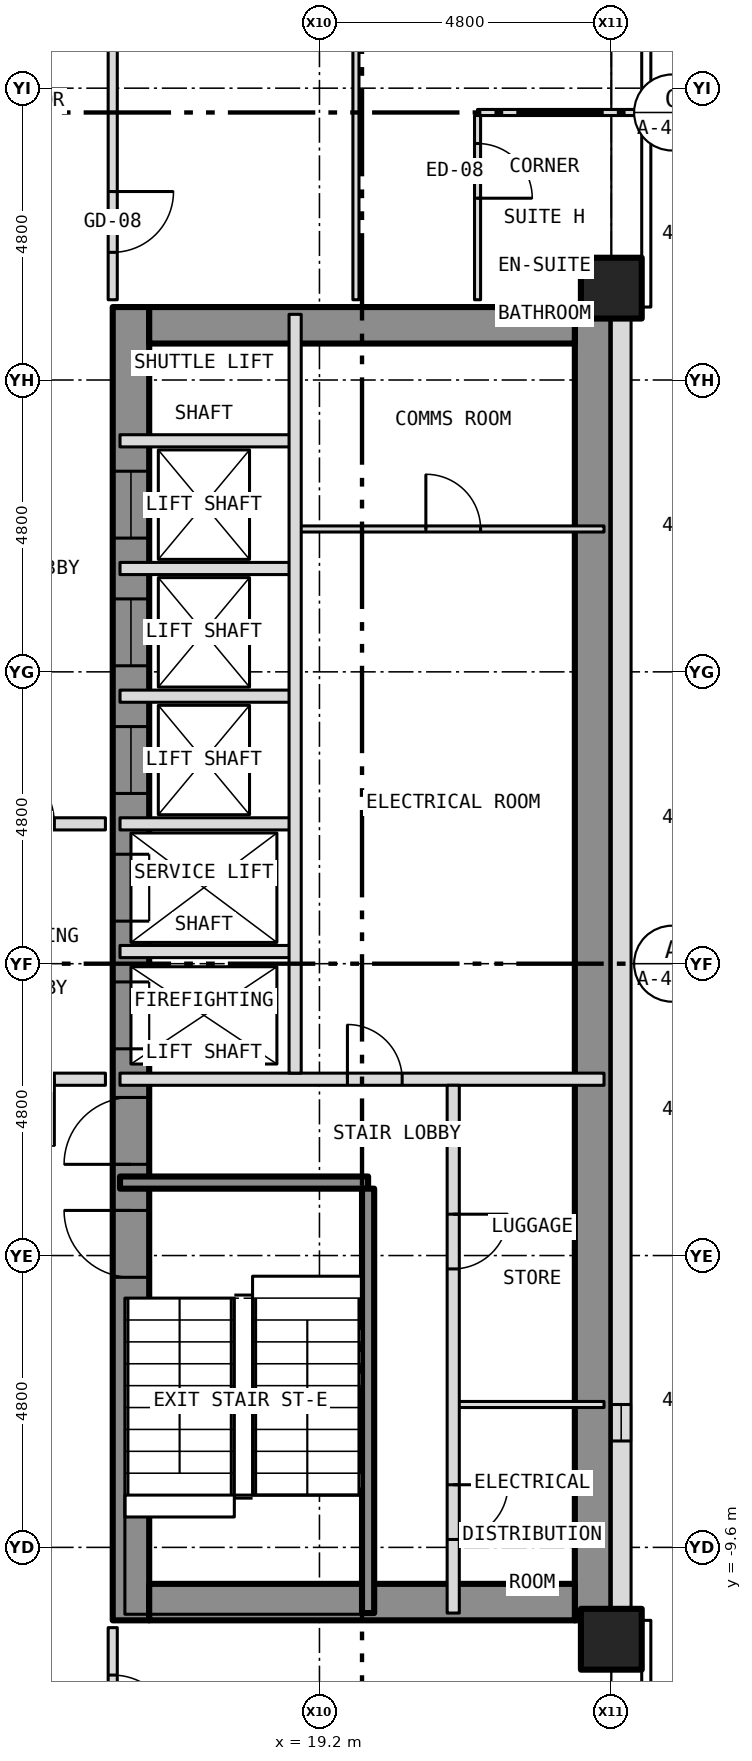
"""IFC4 building model, lengths in metres.
Left out: names, types, materials, properties, quantities, classifications, styles, units other than length and angle.
Written with IfcOpenShell. Run it as: python <this file> out.ifc"""

import sys

from ifc_helpers import new_model, si_unit, direction, frame, frame_2d, origin, origin_2d, place, context, subcontext, project, spatial, rectangle, hollow_rectangle, extrude, element, fill, save


model = new_model("IFC4")
c1 = context("Model", 3, precision=1e-05, world=origin(), true_north=direction((0.0, 1.0)))
c2 = subcontext(c1, "Body", "Model", "MODEL_VIEW")
j1 = project(units=[si_unit("LENGTHUNIT", "METRE"), si_unit("PLANEANGLEUNIT", "RADIAN")], contexts=[c1])
p1 = place(None, origin())
s1 = spatial("IfcSite", under=j1, at=p1, CompositionType="ELEMENT")
p2 = place(p1, origin())
s2 = spatial("IfcBuilding", under=s1, at=p2, CompositionType="ELEMENT")
p3 = place(p2, frame((0.0, 0.0, 81.0)))
s3 = spatial("IfcBuildingStorey", under=s2, at=p3, CompositionType="ELEMENT", Elevation=81.0)
for number, where, z_axis, x_axis in (
    (1, (24.0, -11.111, -0.15), (0.0, 0.0, 1.0), (1.0, 0.0, 0.0)),
    (2, (24.0, 11.111, -0.15), (0.0, 0.0, 1.0), (1.0, 0.0, 0.0)),
):
    element("IfcColumn", number, at=place(p3, frame(where, z_axis=z_axis, x_axis=x_axis)), inside=s3, PredefinedType="COLUMN", context=c2, shape_type="SweptSolid", body=[
        extrude(hollow_rectangle(XDim=1.0, YDim=1.0, WallThickness=0.06, at=origin_2d()), origin(), (0.0, 0.0, 1.0), 3.35),
    ])
p4 = place(p3, frame((16.1, -10.8, 0.0), z_axis=(0.0, 0.0, 1.0), x_axis=(0.0, 1.0, 0.0)))
e3 = element("IfcWall", 3, at=p4, inside=s3, PredefinedType="SHEAR", context=c2, shape_type="SweptSolid", body=[
    extrude(rectangle(XDim=21.6, YDim=0.6, at=frame_2d((10.8, 0.0))), origin(), (0.0, 0.0, 1.0), 2.9),
])
p5 = place(p4, frame((9.4, 0.0, 0.0)))
e4 = element("IfcOpeningElement", 4, at=p5, cuts=e3, PredefinedType="OPENING", context=c2, shape_type="SweptSolid", body=[
    extrude(rectangle(XDim=1.1, YDim=2.1, at=frame_2d((0.55, 1.05))), frame((0.0, 0.312, 0.0), z_axis=(0.0, -1.0, 0.0), x_axis=(1.0, 0.0, 0.0)), (0.0, 0.0, 1.0), 0.624),
])
p6 = place(p4, frame((11.5, 0.0, 0.0)))
e5 = element("IfcOpeningElement", 5, at=p6, cuts=e3, PredefinedType="OPENING", context=c2, shape_type="SweptSolid", body=[
    extrude(rectangle(XDim=1.1, YDim=2.1, at=frame_2d((0.55, 1.05))), frame((0.0, 0.312, 0.0), z_axis=(0.0, -1.0, 0.0), x_axis=(1.0, 0.0, 0.0)), (0.0, 0.0, 1.0), 0.624),
])
p7 = place(p4, frame((13.6, 0.0, 0.0)))
e6 = element("IfcOpeningElement", 6, at=p7, cuts=e3, PredefinedType="OPENING", context=c2, shape_type="SweptSolid", body=[
    extrude(rectangle(XDim=1.1, YDim=2.1, at=frame_2d((0.55, 1.05))), frame((0.0, 0.312, 0.0), z_axis=(0.0, -1.0, 0.0), x_axis=(1.0, 0.0, 0.0)), (0.0, 0.0, 1.0), 0.624),
])
p8 = place(p4, frame((15.7, 0.0, 0.0)))
e7 = element("IfcOpeningElement", 7, at=p8, cuts=e3, PredefinedType="OPENING", context=c2, shape_type="SweptSolid", body=[
    extrude(rectangle(XDim=1.1, YDim=2.1, at=frame_2d((0.55, 1.05))), frame((0.0, 0.312, 0.0), z_axis=(0.0, -1.0, 0.0), x_axis=(1.0, 0.0, 0.0)), (0.0, 0.0, 1.0), 0.624),
])
p9 = place(p4, frame((17.8, 0.0, 0.0)))
e8 = element("IfcOpeningElement", 8, at=p9, cuts=e3, PredefinedType="OPENING", context=c2, shape_type="SweptSolid", body=[
    extrude(rectangle(XDim=1.1, YDim=2.1, at=frame_2d((0.55, 1.05))), frame((0.0, 0.312, 0.0), z_axis=(0.0, -1.0, 0.0), x_axis=(1.0, 0.0, 0.0)), (0.0, 0.0, 1.0), 0.624),
])
p10 = place(p4, frame((5.642, 0.0, 0.0)))
e9 = element("IfcOpeningElement", 9, at=p10, cuts=e3, PredefinedType="OPENING", context=c2, shape_type="SweptSolid", body=[
    extrude(rectangle(XDim=1.1, YDim=2.1, at=frame_2d((0.55, 1.05))), frame((0.0, 0.312, 0.0), z_axis=(0.0, -1.0, 0.0), x_axis=(1.0, 0.0, 0.0)), (0.0, 0.0, 1.0), 0.624),
])
p11 = place(p4, frame((7.5, 0.0, 0.0)))
e10 = element("IfcOpeningElement", 10, at=p11, cuts=e3, PredefinedType="OPENING", context=c2, shape_type="SweptSolid", body=[
    extrude(rectangle(XDim=1.1, YDim=2.1, at=frame_2d((0.55, 1.05))), frame((0.0, 0.312, 0.0), z_axis=(0.0, -1.0, 0.0), x_axis=(1.0, 0.0, 0.0)), (0.0, 0.0, 1.0), 0.624),
])
p12 = place(p3, frame((23.7, -10.8, 0.0), z_axis=(0.0, 0.0, 1.0), x_axis=(0.0, 1.0, 0.0)))
e11 = element("IfcWall", 11, at=p12, inside=s3, PredefinedType="SHEAR", context=c2, shape_type="SweptSolid", body=[
    extrude(rectangle(XDim=21.6, YDim=0.6, at=frame_2d((10.8, 0.0))), origin(), (0.0, 0.0, 1.0), 2.9),
])
for number, where, z_axis, x_axis in (
    (12, (16.4, 10.5, 0.0), (0.0, 0.0, 1.0), (1.0, 0.0, 0.0)),
    (13, (16.4, -10.5, 0.0), (0.0, 0.0, 1.0), (1.0, 0.0, 0.0)),
):
    element("IfcWall", number, at=place(p3, frame(where, z_axis=z_axis, x_axis=x_axis)), inside=s3, PredefinedType="SHEAR", context=c2, shape_type="SweptSolid", body=[
        extrude(rectangle(XDim=7.0, YDim=0.6, at=frame_2d((3.5, 0.0))), origin(), (0.0, 0.0, 1.0), 2.9),
    ])
p13 = place(p3, frame((24.163, -10.8, 0.0), z_axis=(0.0, 0.0, 1.0), x_axis=(0.0, 1.0, 0.0)))
e14 = element("IfcWall", 14, at=p13, inside=s3, PredefinedType="SOLIDWALL", context=c2, shape_type="SweptSolid", body=[
    extrude(rectangle(XDim=21.6, YDim=0.325, at=frame_2d((10.8, 0.0))), origin(), (0.0, 0.0, 1.0), 3.5),
])
p14 = place(p13, frame((2.95, 0.0, 1.0)))
e15 = element("IfcOpeningElement", 15, at=p14, cuts=e14, PredefinedType="OPENING", context=c2, shape_type="SweptSolid", body=[
    extrude(rectangle(XDim=0.6, YDim=1.5, at=frame_2d((0.3, 0.75))), frame((0.0, 0.175, 0.0), z_axis=(0.0, -1.0, 0.0), x_axis=(1.0, 0.0, 0.0)), (0.0, 0.0, 1.0), 0.349),
])
p15 = place(p3, frame((21.4, -7.25, 0.0), z_axis=(0.0, 0.0, 1.0), x_axis=(1.0, 0.0, 0.0)))
e16 = element("IfcWall", 16, at=p15, inside=s3, PredefinedType="PARTITIONING", context=c2, shape_type="SweptSolid", body=[
    extrude(rectangle(XDim=2.48, YDim=0.1, at=frame_2d((1.24, 0.0))), origin(), (0.0, 0.0, 1.0), 2.9),
])
p16 = place(p3, frame((15.92, -3.6, 0.0), z_axis=(0.0, 0.0, 1.0), x_axis=(1.0, 0.0, 0.0)))
e17 = element("IfcWall", 17, at=p16, inside=s3, PredefinedType="SHEAR", context=c2, shape_type="SweptSolid", body=[
    extrude(rectangle(XDim=4.08, YDim=0.2, at=frame_2d((2.04, 0.0))), origin(), (0.0, 0.0, 1.0), 2.9),
])
p17 = place(p3, frame((12.4, -1.9, 0.0), z_axis=(0.0, 0.0, 1.0), x_axis=(1.0, 0.0, 0.0)))
e18 = element("IfcWall", 18, at=p17, inside=s3, PredefinedType="PARTITIONING", context=c2, shape_type="SweptSolid", body=[
    extrude(rectangle(XDim=3.28, YDim=0.2, at=frame_2d((1.64, 0.0))), origin(), (0.0, 0.0, 1.0), 3.2),
])
p18 = place(p17, frame((1.34, 0.0, 0.0)))
e19 = element("IfcOpeningElement", 19, at=p18, cuts=e18, PredefinedType="OPENING", context=c2, shape_type="SweptSolid", body=[
    extrude(rectangle(XDim=1.1, YDim=2.1, at=frame_2d((0.55, 1.05))), frame((0.0, 0.112, 0.0), z_axis=(0.0, -1.0, 0.0), x_axis=(1.0, 0.0, 0.0)), (0.0, 0.0, 1.0), 0.224),
])
p19 = place(p3, frame((15.92, -1.9, 0.0), z_axis=(0.0, 0.0, 1.0), x_axis=(1.0, 0.0, 0.0)))
e20 = element("IfcWall", 20, at=p19, inside=s3, PredefinedType="PARTITIONING", context=c2, shape_type="SweptSolid", body=[
    extrude(rectangle(XDim=7.96, YDim=0.2, at=frame_2d((3.98, 0.0))), origin(), (0.0, 0.0, 1.0), 2.9),
])
p20 = place(p19, frame((3.74, 0.0, 0.0)))
e21 = element("IfcOpeningElement", 21, at=p20, cuts=e20, PredefinedType="OPENING", context=c2, shape_type="SweptSolid", body=[
    extrude(rectangle(XDim=0.9, YDim=2.1, at=frame_2d((0.45, 1.05))), frame((0.0, 0.112, 0.0), z_axis=(0.0, -1.0, 0.0), x_axis=(1.0, 0.0, 0.0)), (0.0, 0.0, 1.0), 0.224),
])
p21 = place(p3, frame((15.92, 0.2, 0.0), z_axis=(0.0, 0.0, 1.0), x_axis=(1.0, 0.0, 0.0)))
e22 = element("IfcWall", 22, at=p21, inside=s3, PredefinedType="PARTITIONING", context=c2, shape_type="SweptSolid", body=[
    extrude(rectangle(XDim=2.88, YDim=0.2, at=frame_2d((1.44, 0.0))), origin(), (0.0, 0.0, 1.0), 2.9),
])
p22 = place(p3, frame((12.4, 2.3, 0.0), z_axis=(0.0, 0.0, 1.0), x_axis=(1.0, 0.0, 0.0)))
e23 = element("IfcWall", 23, at=p22, inside=s3, PredefinedType="PARTITIONING", context=c2, shape_type="SweptSolid", body=[
    extrude(rectangle(XDim=3.28, YDim=0.2, at=frame_2d((1.64, 0.0))), origin(), (0.0, 0.0, 1.0), 3.2),
])
p23 = place(p22, frame((1.34, 0.0, 0.0)))
e24 = element("IfcOpeningElement", 24, at=p23, cuts=e23, PredefinedType="OPENING", context=c2, shape_type="SweptSolid", body=[
    extrude(rectangle(XDim=1.1, YDim=2.1, at=frame_2d((0.55, 1.05))), frame((0.0, 0.112, 0.0), z_axis=(0.0, -1.0, 0.0), x_axis=(1.0, 0.0, 0.0)), (0.0, 0.0, 1.0), 0.224),
])
for number, where, z_axis, x_axis in (
    (25, (15.92, 2.3, 0.0), (0.0, 0.0, 1.0), (1.0, 0.0, 0.0)),
    (26, (15.92, 4.4, 0.0), (0.0, 0.0, 1.0), (1.0, 0.0, 0.0)),
    (27, (15.92, 6.5, 0.0), (0.0, 0.0, 1.0), (1.0, 0.0, 0.0)),
):
    element("IfcWall", number, at=place(p3, frame(where, z_axis=z_axis, x_axis=x_axis)), inside=s3, PredefinedType="PARTITIONING", context=c2, shape_type="SweptSolid", body=[
        extrude(rectangle(XDim=2.88, YDim=0.2, at=frame_2d((1.44, 0.0))), origin(), (0.0, 0.0, 1.0), 2.9),
    ])
p24 = place(p3, frame((18.8, 7.15, 0.0), z_axis=(0.0, 0.0, 1.0), x_axis=(1.0, 0.0, 0.0)))
e28 = element("IfcWall", 28, at=p24, inside=s3, PredefinedType="PARTITIONING", context=c2, shape_type="SweptSolid", body=[
    extrude(rectangle(XDim=5.08, YDim=0.1, at=frame_2d((2.54, 0.0))), origin(), (0.0, 0.0, 1.0), 2.9),
])
p25 = place(p24, frame((2.15, 0.0, 0.0)))
e29 = element("IfcOpeningElement", 29, at=p25, cuts=e28, PredefinedType="OPENING", context=c2, shape_type="SweptSolid", body=[
    extrude(rectangle(XDim=0.9, YDim=2.1, at=frame_2d((0.45, 1.05))), frame((0.0, 0.062, 0.0), z_axis=(0.0, -1.0, 0.0), x_axis=(1.0, 0.0, 0.0)), (0.0, 0.0, 1.0), 0.124),
])
p26 = place(p3, frame((15.92, 8.6, 0.0), z_axis=(0.0, 0.0, 1.0), x_axis=(1.0, 0.0, 0.0)))
e30 = element("IfcWall", 30, at=p26, inside=s3, PredefinedType="PARTITIONING", context=c2, shape_type="SweptSolid", body=[
    extrude(rectangle(XDim=2.88, YDim=0.2, at=frame_2d((1.44, 0.0))), origin(), (0.0, 0.0, 1.0), 2.9),
])
p27 = place(p3, frame((21.8, 14.0, 0.0), z_axis=(0.0, 0.0, 1.0), x_axis=(1.0, 0.0, 0.0)))
e31 = element("IfcWall", 31, at=p27, inside=s3, PredefinedType="PARTITIONING", context=c2, shape_type="SweptSolid", body=[
    extrude(rectangle(XDim=2.73, YDim=0.1, at=frame_2d((1.365, 0.0))), origin(), (0.0, 0.0, 1.0), 3.2),
])
p28 = place(p3, frame((15.8, -15.725, 0.0), z_axis=(0.0, 0.0, 1.0), x_axis=(0.0, 1.0, 0.0)))
e32 = element("IfcWall", 32, at=p28, inside=s3, PredefinedType="PARTITIONING", context=c2, shape_type="SweptSolid", body=[
    extrude(rectangle(XDim=4.805, YDim=0.15, at=frame_2d((2.403, 0.0))), origin(), (0.0, 0.0, 1.0), 3.2),
])
p29 = place(p28, frame((3.025, 0.0, 0.0)))
e33 = element("IfcOpeningElement", 33, at=p29, cuts=e32, PredefinedType="OPENING", context=c2, shape_type="SweptSolid", body=[
    extrude(rectangle(XDim=1.0, YDim=2.1, at=frame_2d((0.5, 1.05))), frame((0.0, 0.087, 0.0), z_axis=(0.0, -1.0, 0.0), x_axis=(1.0, 0.0, 0.0)), (0.0, 0.0, 1.0), 0.174),
])
p30 = place(p3, frame((15.8, 10.92, 0.0), z_axis=(0.0, 0.0, 1.0), x_axis=(0.0, 1.0, 0.0)))
e34 = element("IfcWall", 34, at=p30, inside=s3, PredefinedType="PARTITIONING", context=c2, shape_type="SweptSolid", body=[
    extrude(rectangle(XDim=4.805, YDim=0.15, at=frame_2d((2.403, 0.0))), origin(), (0.0, 0.0, 1.0), 3.2),
])
p31 = place(p30, frame((0.78, 0.0, 0.0)))
e35 = element("IfcOpeningElement", 35, at=p31, cuts=e34, PredefinedType="OPENING", context=c2, shape_type="SweptSolid", body=[
    extrude(rectangle(XDim=1.0, YDim=2.1, at=frame_2d((0.5, 1.05))), frame((0.0, 0.087, 0.0), z_axis=(0.0, -1.0, 0.0), x_axis=(1.0, 0.0, 0.0)), (0.0, 0.0, 1.0), 0.174),
])
p32 = place(p3, frame((18.8, -1.8, 0.0), z_axis=(0.0, 0.0, 1.0), x_axis=(0.0, 1.0, 0.0)))
e36 = element("IfcWall", 36, at=p32, inside=s3, PredefinedType="PARTITIONING", context=c2, shape_type="SweptSolid", body=[
    extrude(rectangle(XDim=12.48, YDim=0.2, at=frame_2d((6.24, 0.0))), origin(), (0.0, 0.0, 1.0), 2.9),
])
p33 = place(p3, frame((19.8, 10.92, 0.0), z_axis=(0.0, 0.0, 1.0), x_axis=(0.0, 1.0, 0.0)))
e37 = element("IfcWall", 37, at=p33, inside=s3, PredefinedType="PARTITIONING", context=c2, shape_type="SweptSolid", body=[
    extrude(rectangle(XDim=12.96, YDim=0.1, at=frame_2d((6.48, 0.0))), origin(), (0.0, 0.0, 1.0), 3.2),
])
p34 = place(p33, frame((6.03, 0.0, 0.0)))
e38 = element("IfcOpeningElement", 38, at=p34, cuts=e37, PredefinedType="OPENING", context=c2, shape_type="SweptSolid", body=[
    extrude(rectangle(XDim=0.9, YDim=2.1, at=frame_2d((0.45, 1.05))), frame((0.0, 0.062, 0.0), z_axis=(0.0, -1.0, 0.0), x_axis=(1.0, 0.0, 0.0)), (0.0, 0.0, 1.0), 0.124),
])
p35 = place(p3, frame((20.0, -10.68, 0.0), z_axis=(0.0, 0.0, 1.0), x_axis=(0.0, 1.0, 0.0)))
e39 = element("IfcWall", 39, at=p35, inside=s3, PredefinedType="SHEAR", context=c2, shape_type="SweptSolid", body=[
    extrude(rectangle(XDim=6.98, YDim=0.2, at=frame_2d((3.49, 0.0))), origin(), (0.0, 0.0, 1.0), 2.9),
])
p36 = place(p3, frame((21.4, -10.68, 0.0), z_axis=(0.0, 0.0, 1.0), x_axis=(0.0, 1.0, 0.0)))
e40 = element("IfcWall", 40, at=p36, inside=s3, PredefinedType="PARTITIONING", context=c2, shape_type="SweptSolid", body=[
    extrude(rectangle(XDim=8.68, YDim=0.2, at=frame_2d((4.34, 0.0))), origin(), (0.0, 0.0, 1.0), 2.9),
])
p37 = place(p36, frame((1.21, 0.0, 0.0)))
e41 = element("IfcOpeningElement", 41, at=p37, cuts=e40, PredefinedType="OPENING", context=c2, shape_type="SweptSolid", body=[
    extrude(rectangle(XDim=0.9, YDim=2.1, at=frame_2d((0.45, 1.05))), frame((0.0, 0.112, 0.0), z_axis=(0.0, -1.0, 0.0), x_axis=(1.0, 0.0, 0.0)), (0.0, 0.0, 1.0), 0.224),
])
p38 = place(p36, frame((5.66, 0.0, 0.0)))
e42 = element("IfcOpeningElement", 42, at=p38, cuts=e40, PredefinedType="OPENING", context=c2, shape_type="SweptSolid", body=[
    extrude(rectangle(XDim=0.9, YDim=2.1, at=frame_2d((0.45, 1.05))), frame((0.0, 0.112, 0.0), z_axis=(0.0, -1.0, 0.0), x_axis=(1.0, 0.0, 0.0)), (0.0, 0.0, 1.0), 0.224),
])
p39 = place(p3, frame((21.8, 10.92, 0.0), z_axis=(0.0, 0.0, 1.0), x_axis=(0.0, 1.0, 0.0)))
e43 = element("IfcWall", 43, at=p39, inside=s3, PredefinedType="PARTITIONING", context=c2, shape_type="SweptSolid", body=[
    extrude(rectangle(XDim=3.03, YDim=0.1, at=frame_2d((1.515, 0.0))), origin(), (0.0, 0.0, 1.0), 3.2),
])
p40 = place(p39, frame((1.67, 0.0, 0.0)))
e44 = element("IfcOpeningElement", 44, at=p40, cuts=e43, PredefinedType="OPENING", context=c2, shape_type="SweptSolid", body=[
    extrude(rectangle(XDim=0.9, YDim=2.1, at=frame_2d((0.45, 1.05))), frame((0.0, 0.062, 0.0), z_axis=(0.0, -1.0, 0.0), x_axis=(1.0, 0.0, 0.0)), (0.0, 0.0, 1.0), 0.124),
])
p41 = place(p14, origin())
e45 = element("IfcWindow", 45, at=p41, inside=s3, PartitioningType="SINGLE_PANEL", PredefinedType="WINDOW", context=c2, shape_type="SweptSolid", body=[
    extrude(rectangle(XDim=0.6, YDim=1.5, at=frame_2d((0.3, 0.75))), frame((0.0, -0.073, 0.0), z_axis=(0.0, -1.0, 0.0), x_axis=(1.0, 0.0, 0.0)), (0.0, 0.0, 1.0), 0.06),
])
fill(e15, e45)
p42 = place(p5, origin())
e46 = element("IfcDoor", 46, at=p42, inside=s3, OperationType="SLIDING_TO_LEFT", PredefinedType="DOOR", context=c2, shape_type="SweptSolid", body=[
    extrude(rectangle(XDim=1.1, YDim=2.1, at=frame_2d((0.55, 1.05))), frame((0.0, 0.025, 0.0), z_axis=(0.0, -1.0, 0.0), x_axis=(1.0, 0.0, 0.0)), (0.0, 0.0, 1.0), 0.05),
])
fill(e4, e46)
p43 = place(p6, origin())
e47 = element("IfcDoor", 47, at=p43, inside=s3, OperationType="SLIDING_TO_LEFT", PredefinedType="DOOR", context=c2, shape_type="SweptSolid", body=[
    extrude(rectangle(XDim=1.1, YDim=2.1, at=frame_2d((0.55, 1.05))), frame((0.0, 0.025, 0.0), z_axis=(0.0, -1.0, 0.0), x_axis=(1.0, 0.0, 0.0)), (0.0, 0.0, 1.0), 0.05),
])
fill(e5, e47)
p44 = place(p7, origin())
e48 = element("IfcDoor", 48, at=p44, inside=s3, OperationType="SLIDING_TO_LEFT", PredefinedType="DOOR", context=c2, shape_type="SweptSolid", body=[
    extrude(rectangle(XDim=1.1, YDim=2.1, at=frame_2d((0.55, 1.05))), frame((0.0, 0.025, 0.0), z_axis=(0.0, -1.0, 0.0), x_axis=(1.0, 0.0, 0.0)), (0.0, 0.0, 1.0), 0.05),
])
fill(e6, e48)
p45 = place(p8, origin())
e49 = element("IfcDoor", 49, at=p45, inside=s3, OperationType="SLIDING_TO_LEFT", PredefinedType="DOOR", context=c2, shape_type="SweptSolid", body=[
    extrude(rectangle(XDim=1.1, YDim=2.1, at=frame_2d((0.55, 1.05))), frame((0.0, 0.025, 0.0), z_axis=(0.0, -1.0, 0.0), x_axis=(1.0, 0.0, 0.0)), (0.0, 0.0, 1.0), 0.05),
])
fill(e7, e49)
p46 = place(p9, origin())
e50 = element("IfcDoor", 50, at=p46, inside=s3, OperationType="SLIDING_TO_LEFT", PredefinedType="DOOR", context=c2, shape_type="SweptSolid", body=[
    extrude(rectangle(XDim=1.1, YDim=2.1, at=frame_2d((0.55, 1.05))), frame((0.0, 0.025, 0.0), z_axis=(0.0, -1.0, 0.0), x_axis=(1.0, 0.0, 0.0)), (0.0, 0.0, 1.0), 0.05),
])
fill(e8, e50)
p47 = place(p10, origin())
e51 = element("IfcDoor", 51, at=p47, inside=s3, OperationType="SINGLE_SWING_RIGHT", PredefinedType="DOOR", context=c2, shape_type="SweptSolid", body=[
    extrude(rectangle(XDim=1.1, YDim=2.1, at=frame_2d((0.55, 1.05))), frame((0.0, 0.025, 0.0), z_axis=(0.0, -1.0, 0.0), x_axis=(1.0, 0.0, 0.0)), (0.0, 0.0, 1.0), 0.05),
])
fill(e9, e51)
p48 = place(p11, origin())
e52 = element("IfcDoor", 52, at=p48, inside=s3, OperationType="SINGLE_SWING_LEFT", PredefinedType="DOOR", context=c2, shape_type="SweptSolid", body=[
    extrude(rectangle(XDim=1.1, YDim=2.1, at=frame_2d((0.55, 1.05))), frame((0.0, 0.025, 0.0), z_axis=(0.0, -1.0, 0.0), x_axis=(1.0, 0.0, 0.0)), (0.0, 0.0, 1.0), 0.05),
])
fill(e10, e52)
p49 = place(p37, origin())
e53 = element("IfcDoor", 53, at=p49, inside=s3, OperationType="SINGLE_SWING_RIGHT", PredefinedType="DOOR", context=c2, shape_type="SweptSolid", body=[
    extrude(rectangle(XDim=0.9, YDim=2.1, at=frame_2d((0.45, 1.05))), frame((0.0, 0.025, 0.0), z_axis=(0.0, -1.0, 0.0), x_axis=(1.0, 0.0, 0.0)), (0.0, 0.0, 1.0), 0.05),
])
fill(e41, e53)
p50 = place(p38, origin())
e54 = element("IfcDoor", 54, at=p50, inside=s3, OperationType="SINGLE_SWING_RIGHT", PredefinedType="DOOR", context=c2, shape_type="SweptSolid", body=[
    extrude(rectangle(XDim=0.9, YDim=2.1, at=frame_2d((0.45, 1.05))), frame((0.0, 0.025, 0.0), z_axis=(0.0, -1.0, 0.0), x_axis=(1.0, 0.0, 0.0)), (0.0, 0.0, 1.0), 0.05),
])
fill(e42, e54)
p51 = place(p20, origin())
e55 = element("IfcDoor", 55, at=p51, inside=s3, OperationType="SINGLE_SWING_LEFT", PredefinedType="DOOR", context=c2, shape_type="SweptSolid", body=[
    extrude(rectangle(XDim=0.9, YDim=2.1, at=frame_2d((0.45, 1.05))), frame((0.0, 0.025, 0.0), z_axis=(0.0, -1.0, 0.0), x_axis=(1.0, 0.0, 0.0)), (0.0, 0.0, 1.0), 0.05),
])
fill(e21, e55)
p52 = place(p25, origin())
e56 = element("IfcDoor", 56, at=p52, inside=s3, OperationType="SINGLE_SWING_LEFT", PredefinedType="DOOR", context=c2, shape_type="SweptSolid", body=[
    extrude(rectangle(XDim=0.9, YDim=2.1, at=frame_2d((0.45, 1.05))), frame((0.0, 0.025, 0.0), z_axis=(0.0, -1.0, 0.0), x_axis=(1.0, 0.0, 0.0)), (0.0, 0.0, 1.0), 0.05),
])
fill(e29, e56)
p53 = place(p18, origin())
e57 = element("IfcDoor", 57, at=p53, inside=s3, OperationType="SINGLE_SWING_RIGHT", PredefinedType="DOOR", context=c2, shape_type="SweptSolid", body=[
    extrude(rectangle(XDim=1.1, YDim=2.1, at=frame_2d((0.55, 1.05))), frame((0.0, 0.025, 0.0), z_axis=(0.0, -1.0, 0.0), x_axis=(1.0, 0.0, 0.0)), (0.0, 0.0, 1.0), 0.05),
])
fill(e19, e57)
p54 = place(p23, origin())
e58 = element("IfcDoor", 58, at=p54, inside=s3, OperationType="SINGLE_SWING_LEFT", PredefinedType="DOOR", context=c2, shape_type="SweptSolid", body=[
    extrude(rectangle(XDim=1.1, YDim=2.1, at=frame_2d((0.55, 1.05))), frame((0.0, 0.025, 0.0), z_axis=(0.0, -1.0, 0.0), x_axis=(1.0, 0.0, 0.0)), (0.0, 0.0, 1.0), 0.05),
])
fill(e24, e58)
p55 = place(p29, origin())
e59 = element("IfcDoor", 59, at=p55, inside=s3, OperationType="SINGLE_SWING_LEFT", PredefinedType="DOOR", context=c2, shape_type="SweptSolid", body=[
    extrude(rectangle(XDim=1.0, YDim=2.1, at=frame_2d((0.5, 1.05))), frame((0.0, 0.025, 0.0), z_axis=(0.0, -1.0, 0.0), x_axis=(1.0, 0.0, 0.0)), (0.0, 0.0, 1.0), 0.05),
])
fill(e33, e59)
p56 = place(p31, origin())
e60 = element("IfcDoor", 60, at=p56, inside=s3, OperationType="SINGLE_SWING_RIGHT", PredefinedType="DOOR", context=c2, shape_type="SweptSolid", body=[
    extrude(rectangle(XDim=1.0, YDim=2.1, at=frame_2d((0.5, 1.05))), frame((0.0, 0.025, 0.0), z_axis=(0.0, -1.0, 0.0), x_axis=(1.0, 0.0, 0.0)), (0.0, 0.0, 1.0), 0.05),
])
fill(e35, e60)
p57 = place(p40, origin())
e61 = element("IfcDoor", 61, at=p57, inside=s3, OperationType="SINGLE_SWING_LEFT", PredefinedType="DOOR", context=c2, shape_type="SweptSolid", body=[
    extrude(rectangle(XDim=0.9, YDim=2.1, at=frame_2d((0.45, 1.05))), frame((0.0, 0.025, 0.0), z_axis=(0.0, -1.0, 0.0), x_axis=(1.0, 0.0, 0.0)), (0.0, 0.0, 1.0), 0.05),
])
fill(e44, e61)
save(model, sys.argv[1])
